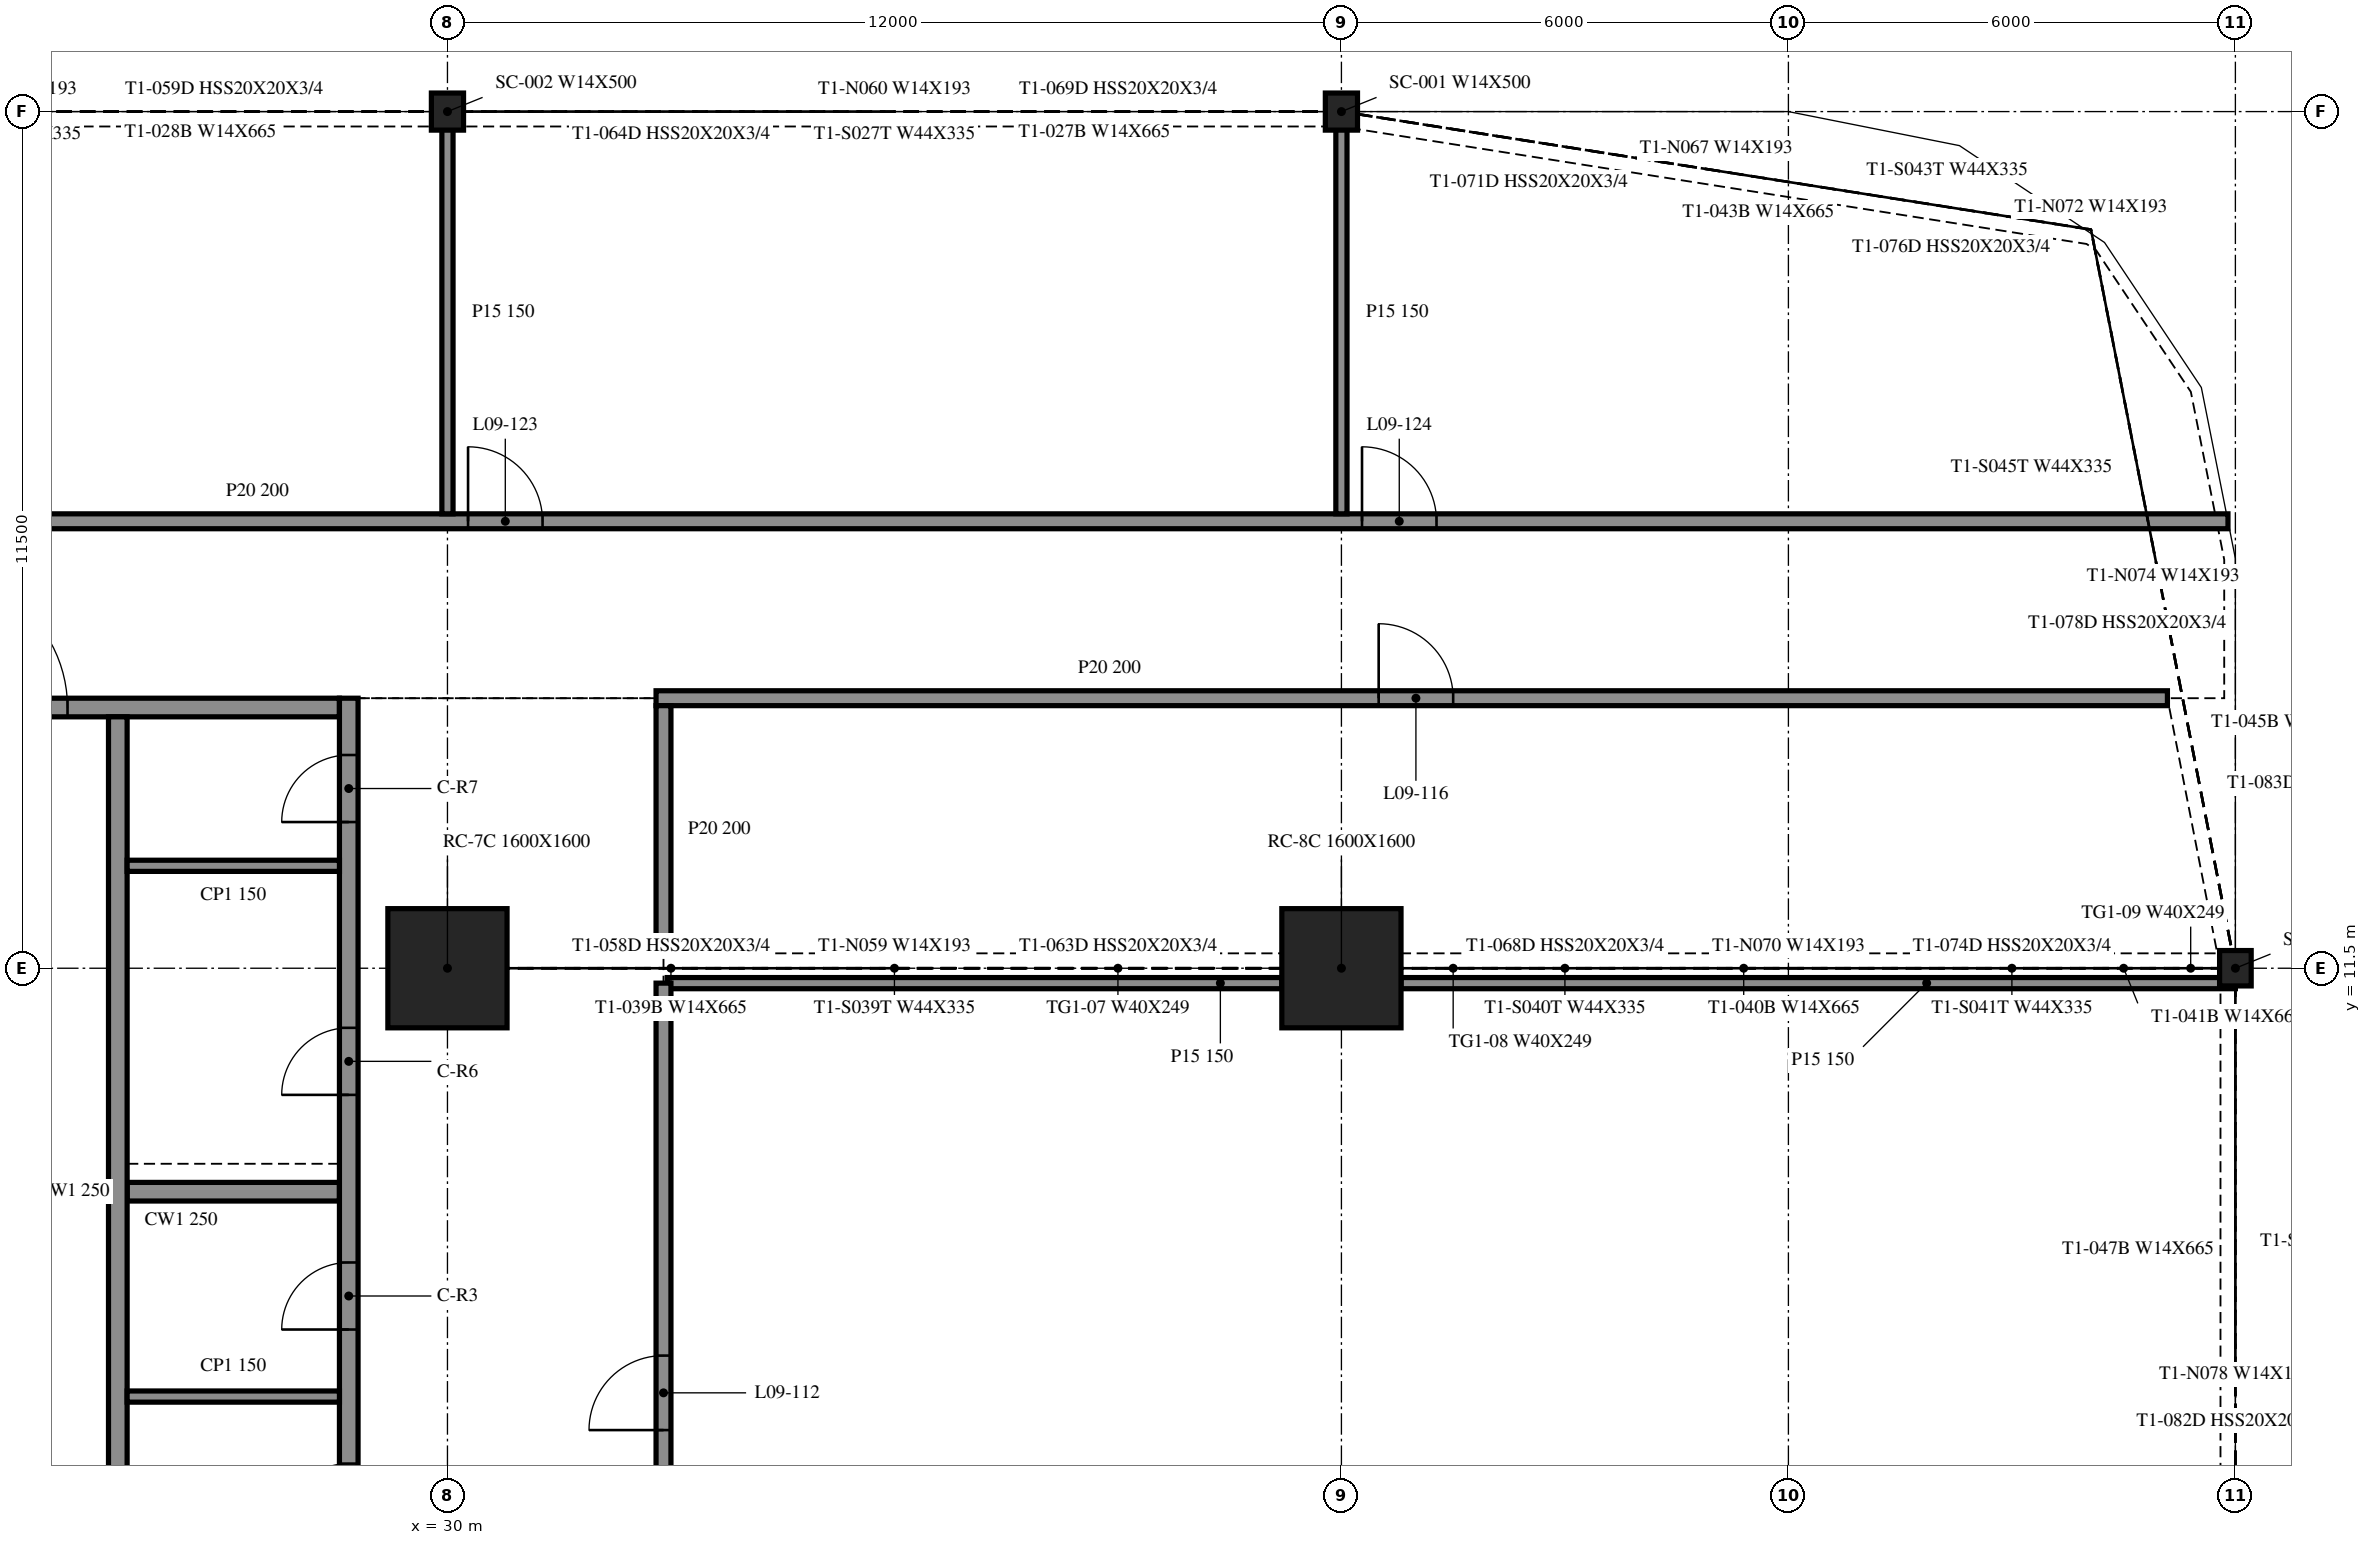
"""IFC4 building model, lengths in metres.
Left out: names, types, materials, properties, quantities, classifications, styles, units other than length and angle.
Written with IfcOpenShell. Run it as: python <this file> out.ifc"""

import sys

from ifc_helpers import new_model, si_unit, direction, frame, frame_2d, origin, origin_2d, place, context, subcontext, project, spatial, rectangle, i_section, extrude, element, fill, save


model = new_model("IFC4")
c1 = context("Model", 3, precision=1e-05, world=origin(), true_north=direction((0.0, 1.0)))
c2 = subcontext(c1, "Body", "Model", "MODEL_VIEW")
j1 = project(units=[si_unit("LENGTHUNIT", "METRE"), si_unit("PLANEANGLEUNIT", "RADIAN")], contexts=[c1])
p1 = place(None, origin())
s1 = spatial("IfcSite", under=j1, at=p1, CompositionType="ELEMENT")
p2 = place(p1, origin())
s2 = spatial("IfcBuilding", under=s1, at=p2, CompositionType="ELEMENT")
p3 = place(p2, frame((0.0, 0.0, 41.6)))
s3 = spatial("IfcBuildingStorey", under=s2, at=p3, CompositionType="ELEMENT", Elevation=41.6)
for number, where, z_axis, x_axis in (
    (1, (30.0, 11.5, -0.55), (0.0, 0.0, 1.0), (1.0, 0.0, 0.0)),
    (2, (42.0, 11.5, -0.55), (0.0, 0.0, 1.0), (1.0, 0.0, 0.0)),
):
    element("IfcColumn", number, at=place(p3, frame(where, z_axis=z_axis, x_axis=x_axis)), inside=s3, PredefinedType="COLUMN", context=c2, shape_type="SweptSolid", body=[
        extrude(rectangle(XDim=1.6, YDim=1.6, at=origin_2d()), origin(), (0.0, 0.0, 1.0), 4.61),
    ])
for number, where, z_axis, x_axis in (
    (3, (42.0, 23.0, -0.55), (0.0, 0.0, 1.0), (1.0, 0.0, 0.0)),
    (4, (30.0, 23.0, -0.55), (0.0, 0.0, 1.0), (1.0, 0.0, 0.0)),
):
    element("IfcColumn", number, at=place(p3, frame(where, z_axis=z_axis, x_axis=x_axis)), inside=s3, PredefinedType="COLUMN", context=c2, shape_type="SweptSolid", body=[
        extrude(i_section(OverallWidth=0.432, OverallDepth=0.498, WebThickness=0.056, FlangeThickness=0.089, at=origin_2d()), origin(), (0.0, 0.0, 1.0), 4.61),
    ])
p4 = place(p3, frame((54.0, 11.5, -0.55), z_axis=(0.0, 0.0, 1.0), x_axis=(1.0, 0.0, 0.0)))
e5 = element("IfcColumn", 5, at=p4, inside=s3, PredefinedType="COLUMN", context=c2, shape_type="SweptSolid", body=[
    extrude(i_section(OverallWidth=0.424, OverallDepth=0.475, WebThickness=0.048, FlangeThickness=0.077, at=origin_2d()), origin(), (0.0, 0.0, 1.0), 4.61),
])
p5 = place(p3, frame((28.675, -9.125, 0.0), z_axis=(0.0, 0.0, 1.0), x_axis=(0.0, 1.0, 0.0)))
e6 = element("IfcWall", 6, at=p5, inside=s3, PredefinedType="SOLIDWALL", context=c2, shape_type="SweptSolid", body=[
    extrude(rectangle(XDim=24.25, YDim=0.25, at=frame_2d((12.125, 0.0))), origin(), (0.0, 0.0, 1.0), 4.06),
])
p6 = place(p5, frame((13.075, 0.0, 0.0)))
e7 = element("IfcOpeningElement", 7, at=p6, cuts=e6, PredefinedType="OPENING", context=c2, shape_type="SweptSolid", body=[
    extrude(rectangle(XDim=0.9, YDim=2.1, at=frame_2d((0.45, 1.05))), frame((0.0, 0.135, 0.0), z_axis=(0.0, -1.0, 0.0), x_axis=(1.0, 0.0, 0.0)), (0.0, 0.0, 1.0), 0.27),
])
p7 = place(p5, frame((15.775, 0.0, 0.0)))
e8 = element("IfcOpeningElement", 8, at=p7, cuts=e6, PredefinedType="OPENING", context=c2, shape_type="SweptSolid", body=[
    extrude(rectangle(XDim=0.9, YDim=2.1, at=frame_2d((0.45, 1.05))), frame((0.0, 0.135, 0.0), z_axis=(0.0, -1.0, 0.0), x_axis=(1.0, 0.0, 0.0)), (0.0, 0.0, 1.0), 0.27),
])
p8 = place(p5, frame((18.925, 0.0, 0.0)))
e9 = element("IfcOpeningElement", 9, at=p8, cuts=e6, PredefinedType="OPENING", context=c2, shape_type="SweptSolid", body=[
    extrude(rectangle(XDim=0.9, YDim=2.1, at=frame_2d((0.45, 1.05))), frame((0.0, 0.135, 0.0), z_axis=(0.0, -1.0, 0.0), x_axis=(1.0, 0.0, 0.0)), (0.0, 0.0, 1.0), 0.27),
])
p9 = place(p5, frame((22.587, 0.0, 0.0)))
e10 = element("IfcOpeningElement", 10, at=p9, cuts=e6, PredefinedType="OPENING", context=c2, shape_type="SweptSolid", body=[
    extrude(rectangle(XDim=0.9, YDim=2.1, at=frame_2d((0.45, 1.05))), frame((0.0, 0.135, 0.0), z_axis=(0.0, -1.0, 0.0), x_axis=(1.0, 0.0, 0.0)), (0.0, 0.0, 1.0), 0.27),
])
p10 = place(p3, frame((19.45, 15.0, 0.0), z_axis=(0.0, 0.0, 1.0), x_axis=(1.0, 0.0, 0.0)))
e11 = element("IfcWall", 11, at=p10, inside=s3, PredefinedType="SOLIDWALL", context=c2, shape_type="SweptSolid", body=[
    extrude(rectangle(XDim=9.1, YDim=0.25, at=frame_2d((4.55, 0.0))), origin(), (0.0, 0.0, 1.0), 4.06),
])
p11 = place(p10, frame((3.65, 0.0, 0.0)))
e12 = element("IfcOpeningElement", 12, at=p11, cuts=e11, PredefinedType="OPENING", context=c2, shape_type="SweptSolid", body=[
    extrude(rectangle(XDim=1.8, YDim=2.1, at=frame_2d((0.9, 1.05))), frame((0.0, 0.135, 0.0), z_axis=(0.0, -1.0, 0.0), x_axis=(1.0, 0.0, 0.0)), (0.0, 0.0, 1.0), 0.27),
])
p12 = place(p3, frame((25.575, 14.875, 0.0), z_axis=(0.0, 0.0, 1.0), x_axis=(0.0, -1.0, 0.0)))
e13 = element("IfcWall", 13, at=p12, inside=s3, PredefinedType="SOLIDWALL", context=c2, shape_type="SweptSolid", body=[
    extrude(rectangle(XDim=17.5, YDim=0.25, at=frame_2d((8.75, 0.0))), origin(), (0.0, 0.0, 1.0), 4.06),
])
p13 = place(p12, frame((15.45, 0.0, 0.0)))
e14 = element("IfcOpeningElement", 14, at=p13, cuts=e13, PredefinedType="OPENING", context=c2, shape_type="SweptSolid", body=[
    extrude(rectangle(XDim=1.1, YDim=2.1, at=frame_2d((0.55, 1.05))), frame((0.0, 0.135, 0.0), z_axis=(0.0, -1.0, 0.0), x_axis=(1.0, 0.0, 0.0)), (0.0, 0.0, 1.0), 0.27),
])
p14 = place(p12, frame((12.8, 0.0, 0.0)))
e15 = element("IfcOpeningElement", 15, at=p14, cuts=e13, PredefinedType="OPENING", context=c2, shape_type="SweptSolid", body=[
    extrude(rectangle(XDim=0.9, YDim=2.1, at=frame_2d((0.45, 1.05))), frame((0.0, 0.135, 0.0), z_axis=(0.0, -1.0, 0.0), x_axis=(1.0, 0.0, 0.0)), (0.0, 0.0, 1.0), 0.27),
])
p15 = place(p3, frame((25.7, 8.5, 0.0), z_axis=(0.0, 0.0, 1.0), x_axis=(1.0, 0.0, 0.0)))
e16 = element("IfcWall", 16, at=p15, inside=s3, PredefinedType="SOLIDWALL", context=c2, shape_type="SweptSolid", body=[
    extrude(rectangle(XDim=2.85, YDim=0.25, at=frame_2d((1.425, 0.0))), origin(), (0.0, 0.0, 1.0), 4.06),
])
for number, where, z_axis, x_axis in (
    (17, (25.7, 5.75, 0.0), (0.0, 0.0, 1.0), (1.0, 0.0, 0.0)),
    (18, (25.7, 12.875, 0.0), (0.0, 0.0, 1.0), (1.0, 0.0, 0.0)),
):
    element("IfcWall", number, at=place(p3, frame(where, z_axis=z_axis, x_axis=x_axis)), inside=s3, PredefinedType="PARTITIONING", context=c2, shape_type="SweptSolid", body=[
        extrude(rectangle(XDim=2.85, YDim=0.15, at=frame_2d((1.425, 0.0))), origin(), (0.0, 0.0, 1.0), 4.06),
    ])
p16 = place(p3, frame((32.95, 11.3, 0.0), z_axis=(0.0, 0.0, 1.0), x_axis=(1.0, 0.0, 0.0)))
e19 = element("IfcWall", 19, at=p16, inside=s3, PredefinedType="PARTITIONING", context=c2, shape_type="SweptSolid", body=[
    extrude(rectangle(XDim=8.25, YDim=0.15, at=frame_2d((4.125, 0.0))), origin(), (0.0, 0.0, 1.0), 4.06),
])
p17 = place(p3, frame((42.8, 11.3, 0.0), z_axis=(0.0, 0.0, 1.0), x_axis=(1.0, 0.0, 0.0)))
e20 = element("IfcWall", 20, at=p17, inside=s3, PredefinedType="PARTITIONING", context=c2, shape_type="SweptSolid", body=[
    extrude(rectangle(XDim=11.2, YDim=0.15, at=frame_2d((5.6, 0.0))), origin(), (0.0, 0.0, 1.0), 4.06),
])
p18 = place(p3, frame((32.8, 15.125, 0.0), z_axis=(0.0, 0.0, 1.0), x_axis=(1.0, 0.0, 0.0)))
e21 = element("IfcWall", 21, at=p18, inside=s3, PredefinedType="PARTITIONING", context=c2, shape_type="SweptSolid", body=[
    extrude(rectangle(XDim=20.288, YDim=0.2, at=frame_2d((10.144, 0.0))), origin(), (0.0, 0.0, 1.0), 4.06),
])
p19 = place(p18, frame((9.7, 0.0, 0.0)))
e22 = element("IfcOpeningElement", 22, at=p19, cuts=e21, PredefinedType="OPENING", context=c2, shape_type="SweptSolid", body=[
    extrude(rectangle(XDim=1.0, YDim=2.1, at=frame_2d((0.5, 1.05))), frame((0.0, 0.11, 0.0), z_axis=(0.0, -1.0, 0.0), x_axis=(1.0, 0.0, 0.0)), (0.0, 0.0, 1.0), 0.22),
])
p20 = place(p3, frame((-40.624, 17.5, 0.0), z_axis=(0.0, 0.0, 1.0), x_axis=(1.0, 0.0, 0.0)))
e23 = element("IfcWall", 23, at=p20, inside=s3, PredefinedType="PARTITIONING", context=c2, shape_type="SweptSolid", body=[
    extrude(rectangle(XDim=94.524, YDim=0.2, at=frame_2d((47.262, 0.0))), origin(), (0.0, 0.0, 1.0), 4.06),
])
p21 = place(p20, frame((9.3, 0.0, 0.0)))
e24 = element("IfcOpeningElement", 24, at=p21, cuts=e23, PredefinedType="OPENING", context=c2, shape_type="SweptSolid", body=[
    extrude(rectangle(XDim=1.0, YDim=2.1, at=frame_2d((0.5, 1.05))), frame((0.0, 0.11, 0.0), z_axis=(0.0, -1.0, 0.0), x_axis=(1.0, 0.0, 0.0)), (0.0, 0.0, 1.0), 0.22),
])
p22 = place(p20, frame((21.3, 0.0, 0.0)))
e25 = element("IfcOpeningElement", 25, at=p22, cuts=e23, PredefinedType="OPENING", context=c2, shape_type="SweptSolid", body=[
    extrude(rectangle(XDim=1.0, YDim=2.1, at=frame_2d((0.5, 1.05))), frame((0.0, 0.11, 0.0), z_axis=(0.0, -1.0, 0.0), x_axis=(1.0, 0.0, 0.0)), (0.0, 0.0, 1.0), 0.22),
])
p23 = place(p20, frame((33.5, 0.0, 0.0)))
e26 = element("IfcOpeningElement", 26, at=p23, cuts=e23, PredefinedType="OPENING", context=c2, shape_type="SweptSolid", body=[
    extrude(rectangle(XDim=0.9, YDim=2.1, at=frame_2d((0.45, 1.05))), frame((0.0, 0.11, 0.0), z_axis=(0.0, -1.0, 0.0), x_axis=(1.0, 0.0, 0.0)), (0.0, 0.0, 1.0), 0.22),
])
p24 = place(p20, frame((45.1, 0.0, 0.0)))
e27 = element("IfcOpeningElement", 27, at=p24, cuts=e23, PredefinedType="OPENING", context=c2, shape_type="SweptSolid", body=[
    extrude(rectangle(XDim=1.2, YDim=2.1, at=frame_2d((0.6, 1.05))), frame((0.0, 0.11, 0.0), z_axis=(0.0, -1.0, 0.0), x_axis=(1.0, 0.0, 0.0)), (0.0, 0.0, 1.0), 0.22),
])
p25 = place(p20, frame((46.9, 0.0, 0.0)))
e28 = element("IfcOpeningElement", 28, at=p25, cuts=e23, PredefinedType="OPENING", context=c2, shape_type="SweptSolid", body=[
    extrude(rectangle(XDim=1.2, YDim=2.1, at=frame_2d((0.6, 1.05))), frame((0.0, 0.11, 0.0), z_axis=(0.0, -1.0, 0.0), x_axis=(1.0, 0.0, 0.0)), (0.0, 0.0, 1.0), 0.22),
])
p26 = place(p20, frame((58.9, 0.0, 0.0)))
e29 = element("IfcOpeningElement", 29, at=p26, cuts=e23, PredefinedType="OPENING", context=c2, shape_type="SweptSolid", body=[
    extrude(rectangle(XDim=1.2, YDim=2.1, at=frame_2d((0.6, 1.05))), frame((0.0, 0.11, 0.0), z_axis=(0.0, -1.0, 0.0), x_axis=(1.0, 0.0, 0.0)), (0.0, 0.0, 1.0), 0.22),
])
p27 = place(p20, frame((70.9, 0.0, 0.0)))
e30 = element("IfcOpeningElement", 30, at=p27, cuts=e23, PredefinedType="OPENING", context=c2, shape_type="SweptSolid", body=[
    extrude(rectangle(XDim=1.0, YDim=2.1, at=frame_2d((0.5, 1.05))), frame((0.0, 0.11, 0.0), z_axis=(0.0, -1.0, 0.0), x_axis=(1.0, 0.0, 0.0)), (0.0, 0.0, 1.0), 0.22),
])
p28 = place(p20, frame((82.9, 0.0, 0.0)))
e31 = element("IfcOpeningElement", 31, at=p28, cuts=e23, PredefinedType="OPENING", context=c2, shape_type="SweptSolid", body=[
    extrude(rectangle(XDim=1.0, YDim=2.1, at=frame_2d((0.5, 1.05))), frame((0.0, 0.11, 0.0), z_axis=(0.0, -1.0, 0.0), x_axis=(1.0, 0.0, 0.0)), (0.0, 0.0, 1.0), 0.22),
])
p29 = place(p3, frame((30.0, 17.6, 0.0), z_axis=(0.0, 0.0, 1.0), x_axis=(0.0, 1.0, 0.0)))
e32 = element("IfcWall", 32, at=p29, inside=s3, PredefinedType="PARTITIONING", context=c2, shape_type="SweptSolid", body=[
    extrude(rectangle(XDim=5.4, YDim=0.15, at=frame_2d((2.7, 0.0))), origin(), (0.0, 0.0, 1.0), 4.06),
])
p30 = place(p3, frame((32.9, 0.2, 0.0), z_axis=(0.0, 0.0, 1.0), x_axis=(0.0, 1.0, 0.0)))
e33 = element("IfcWall", 33, at=p30, inside=s3, PredefinedType="PARTITIONING", context=c2, shape_type="SweptSolid", body=[
    extrude(rectangle(XDim=11.1, YDim=0.2, at=frame_2d((5.55, 0.0))), origin(), (0.0, 0.0, 1.0), 4.06),
])
p31 = place(p30, frame((5.1, 0.0, 0.0)))
e34 = element("IfcOpeningElement", 34, at=p31, cuts=e33, PredefinedType="OPENING", context=c2, shape_type="SweptSolid", body=[
    extrude(rectangle(XDim=1.0, YDim=2.1, at=frame_2d((0.5, 1.05))), frame((0.0, 0.11, 0.0), z_axis=(0.0, -1.0, 0.0), x_axis=(1.0, 0.0, 0.0)), (0.0, 0.0, 1.0), 0.22),
])
p32 = place(p3, frame((32.9, 11.7, 0.0), z_axis=(0.0, 0.0, 1.0), x_axis=(0.0, 1.0, 0.0)))
e35 = element("IfcWall", 35, at=p32, inside=s3, PredefinedType="PARTITIONING", context=c2, shape_type="SweptSolid", body=[
    extrude(rectangle(XDim=3.325, YDim=0.2, at=frame_2d((1.663, 0.0))), origin(), (0.0, 0.0, 1.0), 4.06),
])
p33 = place(p3, frame((42.0, 17.6, 0.0), z_axis=(0.0, 0.0, 1.0), x_axis=(0.0, 1.0, 0.0)))
e36 = element("IfcWall", 36, at=p33, inside=s3, PredefinedType="PARTITIONING", context=c2, shape_type="SweptSolid", body=[
    extrude(rectangle(XDim=5.4, YDim=0.15, at=frame_2d((2.7, 0.0))), origin(), (0.0, 0.0, 1.0), 4.06),
])
p34 = place(p11, origin())
e37 = element("IfcDoor", 37, at=p34, inside=s3, OperationType="DOUBLE_DOOR_SINGLE_SWING", PredefinedType="DOOR", context=c2, shape_type="SweptSolid", body=[
    extrude(rectangle(XDim=1.8, YDim=2.1, at=frame_2d((0.9, 1.05))), frame((0.0, 0.025, 0.0), z_axis=(0.0, -1.0, 0.0), x_axis=(1.0, 0.0, 0.0)), (0.0, 0.0, 1.0), 0.05),
])
fill(e12, e37)
p35 = place(p6, origin())
e38 = element("IfcDoor", 38, at=p35, inside=s3, OperationType="SINGLE_SWING_RIGHT", PredefinedType="DOOR", context=c2, shape_type="SweptSolid", body=[
    extrude(rectangle(XDim=0.9, YDim=2.1, at=frame_2d((0.45, 1.05))), frame((0.0, 0.025, 0.0), z_axis=(0.0, -1.0, 0.0), x_axis=(1.0, 0.0, 0.0)), (0.0, 0.0, 1.0), 0.05),
])
fill(e7, e38)
p36 = place(p7, origin())
e39 = element("IfcDoor", 39, at=p36, inside=s3, OperationType="SINGLE_SWING_LEFT", PredefinedType="DOOR", context=c2, shape_type="SweptSolid", body=[
    extrude(rectangle(XDim=0.9, YDim=2.1, at=frame_2d((0.45, 1.05))), frame((0.0, 0.025, 0.0), z_axis=(0.0, -1.0, 0.0), x_axis=(1.0, 0.0, 0.0)), (0.0, 0.0, 1.0), 0.05),
])
fill(e8, e39)
p37 = place(p8, origin())
e40 = element("IfcDoor", 40, at=p37, inside=s3, OperationType="SINGLE_SWING_RIGHT", PredefinedType="DOOR", context=c2, shape_type="SweptSolid", body=[
    extrude(rectangle(XDim=0.9, YDim=2.1, at=frame_2d((0.45, 1.05))), frame((0.0, 0.025, 0.0), z_axis=(0.0, -1.0, 0.0), x_axis=(1.0, 0.0, 0.0)), (0.0, 0.0, 1.0), 0.05),
])
fill(e9, e40)
p38 = place(p9, origin())
e41 = element("IfcDoor", 41, at=p38, inside=s3, OperationType="SINGLE_SWING_LEFT", PredefinedType="DOOR", context=c2, shape_type="SweptSolid", body=[
    extrude(rectangle(XDim=0.9, YDim=2.1, at=frame_2d((0.45, 1.05))), frame((0.0, 0.025, 0.0), z_axis=(0.0, -1.0, 0.0), x_axis=(1.0, 0.0, 0.0)), (0.0, 0.0, 1.0), 0.05),
])
fill(e10, e41)
p39 = place(p31, origin())
e42 = element("IfcDoor", 42, at=p39, inside=s3, OperationType="SINGLE_SWING_LEFT", PredefinedType="DOOR", context=c2, shape_type="SweptSolid", body=[
    extrude(rectangle(XDim=1.0, YDim=2.1, at=frame_2d((0.5, 1.05))), frame((0.0, 0.025, 0.0), z_axis=(0.0, -1.0, 0.0), x_axis=(1.0, 0.0, 0.0)), (0.0, 0.0, 1.0), 0.05),
])
fill(e34, e42)
p40 = place(p19, origin())
e43 = element("IfcDoor", 43, at=p40, inside=s3, OperationType="SINGLE_SWING_LEFT", PredefinedType="DOOR", context=c2, shape_type="SweptSolid", body=[
    extrude(rectangle(XDim=1.0, YDim=2.1, at=frame_2d((0.5, 1.05))), frame((0.0, 0.025, 0.0), z_axis=(0.0, -1.0, 0.0), x_axis=(1.0, 0.0, 0.0)), (0.0, 0.0, 1.0), 0.05),
])
fill(e22, e43)
p41 = place(p27, origin())
e44 = element("IfcDoor", 44, at=p41, inside=s3, OperationType="SINGLE_SWING_RIGHT", PredefinedType="DOOR", context=c2, shape_type="SweptSolid", body=[
    extrude(rectangle(XDim=1.0, YDim=2.1, at=frame_2d((0.5, 1.05))), frame((0.0, 0.025, 0.0), z_axis=(0.0, -1.0, 0.0), x_axis=(1.0, 0.0, 0.0)), (0.0, 0.0, 1.0), 0.05),
])
fill(e30, e44)
p42 = place(p28, origin())
e45 = element("IfcDoor", 45, at=p42, inside=s3, OperationType="SINGLE_SWING_RIGHT", PredefinedType="DOOR", context=c2, shape_type="SweptSolid", body=[
    extrude(rectangle(XDim=1.0, YDim=2.1, at=frame_2d((0.5, 1.05))), frame((0.0, 0.025, 0.0), z_axis=(0.0, -1.0, 0.0), x_axis=(1.0, 0.0, 0.0)), (0.0, 0.0, 1.0), 0.05),
])
fill(e31, e45)
save(model, sys.argv[1])
